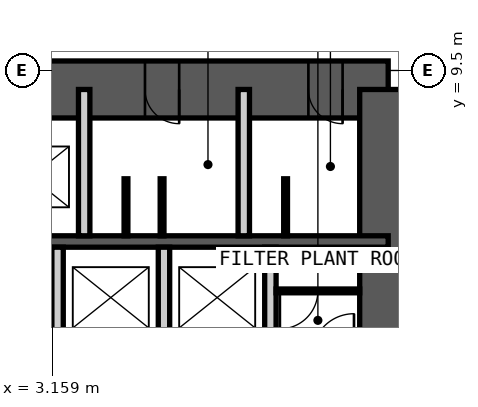
"""IFC4 building model, lengths in metres.
Left out: names, types, materials, properties, quantities, classifications, styles, units other than length and angle.
Written with IfcOpenShell. Run it as: python <this file> out.ifc"""

import sys

from ifc_helpers import new_model, si_unit, direction, frame, frame_2d, origin, place, context, subcontext, project, spatial, rectangle, extrude, element, fill, save


model = new_model("IFC4")
c1 = context("Model", 3, precision=1e-05, world=origin(), true_north=direction((0.0, 1.0)))
c2 = subcontext(c1, "Body", "Model", "MODEL_VIEW")
j1 = project(units=[si_unit("LENGTHUNIT", "METRE"), si_unit("PLANEANGLEUNIT", "RADIAN")], contexts=[c1])
p1 = place(None, origin())
s1 = spatial("IfcSite", under=j1, at=p1, CompositionType="ELEMENT")
p2 = place(p1, origin())
s2 = spatial("IfcBuilding", under=s1, at=p2, CompositionType="ELEMENT")
p3 = place(p2, frame((0.0, 0.0, 103.0)))
s3 = spatial("IfcBuildingStorey", under=s2, at=p3, CompositionType="ELEMENT", Elevation=103.0)
p4 = place(p3, frame((-12.0, 9.0, 0.0), z_axis=(0.0, 0.0, 1.0), x_axis=(1.0, 0.0, 0.0)))
e1 = element("IfcWall", 1, at=p4, inside=s3, PredefinedType="SHEAR", context=c2, shape_type="SweptSolid", body=[
    extrude(rectangle(XDim=24.0, YDim=1.5, at=frame_2d((12.0, 0.0))), origin(), (0.0, 0.0, 1.0), 4.2),
])
p5 = place(p4, frame((10.4, 0.0, 0.0)))
e2 = element("IfcOpeningElement", 2, at=p5, cuts=e1, PredefinedType="OPENING", context=c2, shape_type="SweptSolid", body=[
    extrude(rectangle(XDim=1.0, YDim=2.1, at=frame_2d((0.5, 1.05))), frame((0.0, 0.76, 0.0), z_axis=(0.0, -1.0, 0.0), x_axis=(1.0, 0.0, 0.0)), (0.0, 0.0, 1.0), 1.52),
])
p6 = place(p4, frame((17.6, 0.0, 0.0)))
e3 = element("IfcOpeningElement", 3, at=p6, cuts=e1, PredefinedType="OPENING", context=c2, shape_type="SweptSolid", body=[
    extrude(rectangle(XDim=0.9, YDim=2.1, at=frame_2d((0.45, 1.05))), frame((0.0, 0.76, 0.0), z_axis=(0.0, -1.0, 0.0), x_axis=(1.0, 0.0, 0.0)), (0.0, 0.0, 1.0), 1.52),
])
p7 = place(p4, frame((21.9, 0.0, 0.0)))
e4 = element("IfcOpeningElement", 4, at=p7, cuts=e1, PredefinedType="OPENING", context=c2, shape_type="SweptSolid", body=[
    extrude(rectangle(XDim=0.9, YDim=2.1, at=frame_2d((0.45, 1.05))), frame((0.0, 0.76, 0.0), z_axis=(0.0, -1.0, 0.0), x_axis=(1.0, 0.0, 0.0)), (0.0, 0.0, 1.0), 1.52),
])
p8 = place(p3, frame((12.0, -9.0, 0.0), z_axis=(0.0, 0.0, 1.0), x_axis=(0.0, 1.0, 0.0)))
e5 = element("IfcWall", 5, at=p8, inside=s3, PredefinedType="SHEAR", context=c2, shape_type="SweptSolid", body=[
    extrude(rectangle(XDim=18.0, YDim=1.5, at=frame_2d((9.0, 0.0))), origin(), (0.0, 0.0, 1.0), 4.2),
])
p9 = place(p8, frame((8.1, 0.0, 0.0)))
e6 = element("IfcOpeningElement", 6, at=p9, cuts=e5, PredefinedType="OPENING", context=c2, shape_type="SweptSolid", body=[
    extrude(rectangle(XDim=1.8, YDim=2.1, at=frame_2d((0.9, 1.05))), frame((0.0, 0.76, 0.0), z_axis=(0.0, -1.0, 0.0), x_axis=(1.0, 0.0, 0.0)), (0.0, 0.0, 1.0), 1.52),
])
p10 = place(p3, frame((-12.0, 5.0, 0.0), z_axis=(0.0, 0.0, 1.0), x_axis=(1.0, 0.0, 0.0)))
e7 = element("IfcWall", 7, at=p10, inside=s3, PredefinedType="SHEAR", context=c2, shape_type="SweptSolid", body=[
    extrude(rectangle(XDim=24.0, YDim=0.3, at=frame_2d((12.0, 0.0))), origin(), (0.0, 0.0, 1.0), 4.2),
])
for number, where, z_axis, x_axis in (
    (8, (4.0, 5.15, 0.0), (0.0, 0.0, 1.0), (0.0, 1.0, 0.0)),
    (9, (8.2, 5.15, 0.0), (0.0, 0.0, 1.0), (0.0, 1.0, 0.0)),
):
    element("IfcWall", number, at=place(p3, frame(where, z_axis=z_axis, x_axis=x_axis)), inside=s3, PredefinedType="PARTITIONING", context=c2, shape_type="SweptSolid", body=[
        extrude(rectangle(XDim=3.85, YDim=0.3, at=frame_2d((1.925, 0.0))), origin(), (0.0, 0.0, 1.0), 3.98),
    ])
for number, where, z_axis, x_axis in (
    (10, (3.3, 2.2, 0.0), (0.0, 0.0, 1.0), (0.0, 1.0, 0.0)),
    (11, (6.1, 2.2, 0.0), (0.0, 0.0, 1.0), (0.0, 1.0, 0.0)),
    (12, (8.9, 2.2, 0.0), (0.0, 0.0, 1.0), (0.0, 1.0, 0.0)),
):
    element("IfcWall", number, at=place(p3, frame(where, z_axis=z_axis, x_axis=x_axis)), inside=s3, PredefinedType="PARTITIONING", context=c2, shape_type="SweptSolid", body=[
        extrude(rectangle(XDim=2.65, YDim=0.3, at=frame_2d((1.325, 0.0))), origin(), (0.0, 0.0, 1.0), 3.98),
    ])
p11 = place(p3, frame((9.05, 3.7, 0.0), z_axis=(0.0, 0.0, 1.0), x_axis=(1.0, 0.0, 0.0)))
e13 = element("IfcWall", 13, at=p11, inside=s3, PredefinedType="PARTITIONING", context=c2, shape_type="SweptSolid", body=[
    extrude(rectangle(XDim=2.2, YDim=0.1, at=frame_2d((1.1, 0.0))), origin(), (0.0, 0.0, 1.0), 3.98),
])
p12 = place(p11, frame((0.1, 0.0, 0.0)))
e14 = element("IfcOpeningElement", 14, at=p12, cuts=e13, PredefinedType="OPENING", context=c2, shape_type="SweptSolid", body=[
    extrude(rectangle(XDim=1.0, YDim=2.4, at=frame_2d((0.5, 1.2))), frame((0.0, 0.06, 0.0), z_axis=(0.0, -1.0, 0.0), x_axis=(1.0, 0.0, 0.0)), (0.0, 0.0, 1.0), 0.12),
])
for number, where, z_axis, x_axis in (
    (15, (5.1, 5.15, 0.0), (0.0, 0.0, 1.0), (0.0, 1.0, 0.0)),
    (16, (6.05, 5.15, 0.0), (0.0, 0.0, 1.0), (0.0, 1.0, 0.0)),
    (17, (9.3, 5.15, 0.0), (0.0, 0.0, 1.0), (0.0, 1.0, 0.0)),
):
    element("IfcWall", number, at=place(p3, frame(where, z_axis=z_axis, x_axis=x_axis)), inside=s3, PredefinedType="PARTITIONING", context=c2, shape_type="SweptSolid", body=[
        extrude(rectangle(XDim=1.5, YDim=0.1, at=frame_2d((0.75, 0.0))), origin(), (0.0, 0.0, 1.0), 2.1),
    ])
p13 = place(p6, origin())
e18 = element("IfcDoor", 18, at=p13, inside=s3, OperationType="SINGLE_SWING_RIGHT", PredefinedType="DOOR", context=c2, shape_type="SweptSolid", body=[
    extrude(rectangle(XDim=0.9, YDim=2.1, at=frame_2d((0.45, 1.05))), frame((0.0, 0.025, 0.0), z_axis=(0.0, -1.0, 0.0), x_axis=(1.0, 0.0, 0.0)), (0.0, 0.0, 1.0), 0.05),
])
fill(e3, e18)
p14 = place(p7, origin())
e19 = element("IfcDoor", 19, at=p14, inside=s3, OperationType="SINGLE_SWING_RIGHT", PredefinedType="DOOR", context=c2, shape_type="SweptSolid", body=[
    extrude(rectangle(XDim=0.9, YDim=2.1, at=frame_2d((0.45, 1.05))), frame((0.0, 0.025, 0.0), z_axis=(0.0, -1.0, 0.0), x_axis=(1.0, 0.0, 0.0)), (0.0, 0.0, 1.0), 0.05),
])
fill(e4, e19)
p15 = place(p12, origin())
e20 = element("IfcDoor", 20, at=p15, inside=s3, OperationType="SINGLE_SWING_LEFT", PredefinedType="DOOR", context=c2, shape_type="SweptSolid", body=[
    extrude(rectangle(XDim=1.0, YDim=2.4, at=frame_2d((0.5, 1.2))), frame((0.0, 0.025, 0.0), z_axis=(0.0, -1.0, 0.0), x_axis=(1.0, 0.0, 0.0)), (0.0, 0.0, 1.0), 0.05),
])
fill(e14, e20)
save(model, sys.argv[1])
